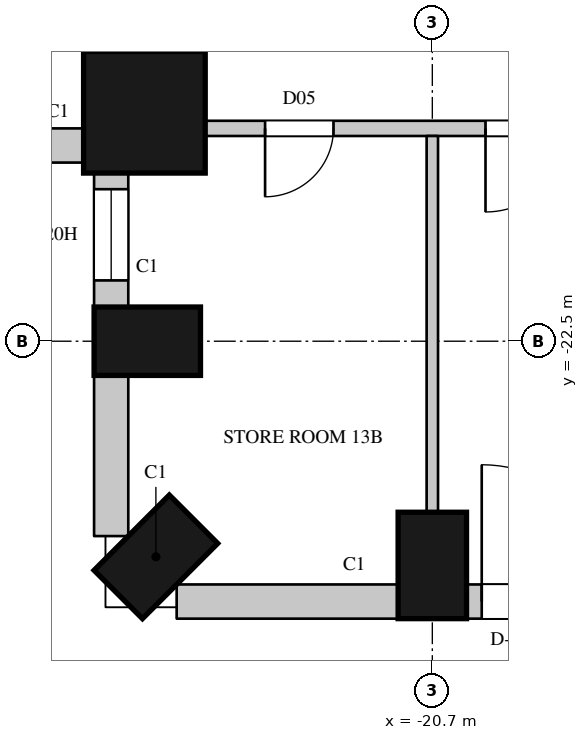
"""IFC4 building model, lengths in metres.
Left out: names, types, materials, properties, quantities, classifications, styles, units other than length and angle.
Written with IfcOpenShell. Run it as: python <this file> out.ifc"""

import sys

from ifc_helpers import new_model, si_unit, direction, frame, frame_2d, origin, origin_2d, place, context, subcontext, project, spatial, rectangle, circle, extrude, element, fill, save


model = new_model("IFC4")
c1 = context("Model", 3, precision=1e-05, world=origin(), true_north=direction((0.0, 1.0)))
c2 = subcontext(c1, "Body", "Model", "MODEL_VIEW")
j1 = project(units=[si_unit("LENGTHUNIT", "METRE"), si_unit("PLANEANGLEUNIT", "RADIAN")], contexts=[c1])
p1 = place(None, origin())
s1 = spatial("IfcSite", under=j1, at=p1, CompositionType="ELEMENT")
p2 = place(p1, origin())
s2 = spatial("IfcBuilding", under=s1, at=p2, CompositionType="ELEMENT")
p3 = place(p2, frame((0.0, 0.0, 77.1)))
s3 = spatial("IfcBuildingStorey", under=s2, at=p3, CompositionType="ELEMENT", Elevation=77.1)
p4 = place(p3, frame((-24.488, -19.488, 0.0), z_axis=(0.0, 0.0, 1.0), x_axis=(1.0, 0.0, 0.0)))
e1 = element("IfcColumn", 1, at=p4, inside=s3, PredefinedType="COLUMN", context=c2, shape_type="SweptSolid", body=[
    extrude(circle(Radius=0.8, at=origin_2d()), origin(), (0.0, 0.0, 1.0), 3.6),
])
for number, where, z_axis, x_axis in (
    (2, (-24.45, -22.5, 0.0), (0.0, 0.0, 1.0), (0.0, -1.0, 0.0)),
    (3, (-24.337, -25.337, 0.0), (0.0, 0.0, 1.0), (0.707, -0.707, 0.0)),
    (4, (-20.7, -25.45, 0.0), (0.0, 0.0, 1.0), (1.0, 0.0, 0.0)),
):
    element("IfcColumn", number, at=place(p3, frame(where, z_axis=z_axis, x_axis=x_axis)), inside=s3, PredefinedType="COLUMN", context=c2, shape_type="SweptSolid", body=[
        extrude(rectangle(XDim=0.9, YDim=1.4, at=origin_2d()), origin(), (0.0, 0.0, 1.0), 3.6),
    ])
p5 = place(p3, frame((-29.064, -19.925, 0.0), z_axis=(0.0, 0.0, 1.0), x_axis=(1.0, 0.0, 0.0)))
e5 = element("IfcWall", 5, at=p5, inside=s3, PredefinedType="SOLIDWALL", context=c2, shape_type="SweptSolid", body=[
    extrude(rectangle(XDim=3.805, YDim=0.45, at=frame_2d((1.903, 0.0))), origin(), (0.0, 0.0, 1.0), 3.3),
])
p6 = place(p5, frame((0.514, 0.0, 1.05)))
e6 = element("IfcOpeningElement", 6, at=p6, cuts=e5, PredefinedType="OPENING", context=c2, shape_type="SweptSolid", body=[
    extrude(rectangle(XDim=2.7, YDim=2.0, at=frame_2d((1.35, 1.0))), frame((0.0, 0.235, 0.0), z_axis=(0.0, -1.0, 0.0), x_axis=(1.0, 0.0, 0.0)), (0.0, 0.0, 1.0), 0.47),
])
p7 = place(p3, frame((-24.925, -20.259, 0.0), z_axis=(0.0, 0.0, 1.0), x_axis=(0.0, -1.0, 0.0)))
e7 = element("IfcWall", 7, at=p7, inside=s3, PredefinedType="SOLIDWALL", context=c2, shape_type="SweptSolid", body=[
    extrude(rectangle(XDim=1.792, YDim=0.45, at=frame_2d((0.896, 0.0))), origin(), (0.0, 0.0, 1.0), 3.3),
])
p8 = place(p7, frame((0.241, 0.0, 1.05)))
e8 = element("IfcOpeningElement", 8, at=p8, cuts=e7, PredefinedType="OPENING", context=c2, shape_type="SweptSolid", body=[
    extrude(rectangle(XDim=1.2, YDim=2.0, at=frame_2d((0.6, 1.0))), frame((0.0, 0.235, 0.0), z_axis=(0.0, -1.0, 0.0), x_axis=(1.0, 0.0, 0.0)), (0.0, 0.0, 1.0), 0.47),
])
p9 = place(p3, frame((-24.925, -22.95, 0.0), z_axis=(0.0, 0.0, 1.0), x_axis=(0.0, -1.0, 0.0)))
e9 = element("IfcWall", 9, at=p9, inside=s3, PredefinedType="SOLIDWALL", context=c2, shape_type="SweptSolid", body=[
    extrude(rectangle(XDim=2.114, YDim=0.45, at=frame_2d((1.057, 0.0))), origin(), (0.0, 0.0, 1.0), 3.3),
])
p10 = place(p3, frame((-24.064, -25.925, 0.0), z_axis=(0.0, 0.0, 1.0), x_axis=(1.0, 0.0, 0.0)))
e10 = element("IfcWall", 10, at=p10, inside=s3, PredefinedType="SOLIDWALL", context=c2, shape_type="SweptSolid", body=[
    extrude(rectangle(XDim=2.914, YDim=0.45, at=frame_2d((1.457, 0.0))), origin(), (0.0, 0.0, 1.0), 3.3),
])
p11 = place(p3, frame((-20.25, -25.925, 0.0), z_axis=(0.0, 0.0, 1.0), x_axis=(1.0, 0.0, 0.0)))
e11 = element("IfcWall", 11, at=p11, inside=s3, PredefinedType="SOLIDWALL", context=c2, shape_type="SweptSolid", body=[
    extrude(rectangle(XDim=8.1, YDim=0.45, at=frame_2d((4.05, 0.0))), origin(), (0.0, 0.0, 1.0), 3.3),
])
p12 = place(p11, frame((0.2, 0.0, 0.0)))
e12 = element("IfcOpeningElement", 12, at=p12, cuts=e11, PredefinedType="OPENING", context=c2, shape_type="SweptSolid", body=[
    extrude(rectangle(XDim=1.8, YDim=2.4, at=frame_2d((0.9, 1.2))), frame((0.0, 0.235, 0.0), z_axis=(0.0, -1.0, 0.0), x_axis=(1.0, 0.0, 0.0)), (0.0, 0.0, 1.0), 0.47),
])
p13 = place(p11, frame((2.2, 0.0, 1.05)))
e13 = element("IfcOpeningElement", 13, at=p13, cuts=e11, PredefinedType="OPENING", context=c2, shape_type="SweptSolid", body=[
    extrude(rectangle(XDim=1.2, YDim=2.0, at=frame_2d((0.6, 1.0))), frame((0.0, 0.235, 0.0), z_axis=(0.0, -1.0, 0.0), x_axis=(1.0, 0.0, 0.0)), (0.0, 0.0, 1.0), 0.47),
])
p14 = place(p11, frame((4.7, 0.0, 0.0)))
e14 = element("IfcOpeningElement", 14, at=p14, cuts=e11, PredefinedType="OPENING", context=c2, shape_type="SweptSolid", body=[
    extrude(rectangle(XDim=1.8, YDim=2.4, at=frame_2d((0.9, 1.2))), frame((0.0, 0.235, 0.0), z_axis=(0.0, -1.0, 0.0), x_axis=(1.0, 0.0, 0.0)), (0.0, 0.0, 1.0), 0.47),
])
p15 = place(p11, frame((6.7, 0.0, 1.05)))
e15 = element("IfcOpeningElement", 15, at=p15, cuts=e11, PredefinedType="OPENING", context=c2, shape_type="SweptSolid", body=[
    extrude(rectangle(XDim=1.2, YDim=2.0, at=frame_2d((0.6, 1.0))), frame((0.0, 0.235, 0.0), z_axis=(0.0, -1.0, 0.0), x_axis=(1.0, 0.0, 0.0)), (0.0, 0.0, 1.0), 0.47),
])
p16 = place(p3, frame((-24.7, -18.7, 0.0), z_axis=(0.0, 0.0, 1.0), x_axis=(0.0, 1.0, 0.0)))
e16 = element("IfcWall", 16, at=p16, inside=s3, PredefinedType="PARTITIONING", context=c2, shape_type="SweptSolid", body=[
    extrude(rectangle(XDim=2.67, YDim=0.2, at=frame_2d((1.335, 0.0))), origin(), (0.0, 0.0, 1.0), 3.3),
])
p17 = place(p16, frame((0.6, 0.0, 0.0)))
e17 = element("IfcOpeningElement", 17, at=p17, cuts=e16, PredefinedType="OPENING", context=c2, shape_type="SweptSolid", body=[
    extrude(rectangle(XDim=1.6, YDim=2.4, at=frame_2d((0.8, 1.2))), frame((0.0, 0.11, 0.0), z_axis=(0.0, -1.0, 0.0), x_axis=(1.0, 0.0, 0.0)), (0.0, 0.0, 1.0), 0.22),
])
p18 = place(p3, frame((-23.7, -19.7, 0.0), z_axis=(0.0, 0.0, 1.0), x_axis=(1.0, 0.0, 0.0)))
e18 = element("IfcWall", 18, at=p18, inside=s3, PredefinedType="PARTITIONING", context=c2, shape_type="SweptSolid", body=[
    extrude(rectangle(XDim=5.1, YDim=0.2, at=frame_2d((2.55, 0.0))), origin(), (0.0, 0.0, 1.0), 3.3),
])
p19 = place(p18, frame((0.8, 0.0, 0.0)))
e19 = element("IfcOpeningElement", 19, at=p19, cuts=e18, PredefinedType="OPENING", context=c2, shape_type="SweptSolid", body=[
    extrude(rectangle(XDim=0.9, YDim=2.2, at=frame_2d((0.45, 1.1))), frame((0.0, 0.11, 0.0), z_axis=(0.0, -1.0, 0.0), x_axis=(1.0, 0.0, 0.0)), (0.0, 0.0, 1.0), 0.22),
])
p20 = place(p18, frame((3.7, 0.0, 0.0)))
e20 = element("IfcOpeningElement", 20, at=p20, cuts=e18, PredefinedType="OPENING", context=c2, shape_type="SweptSolid", body=[
    extrude(rectangle(XDim=1.1, YDim=2.4, at=frame_2d((0.55, 1.2))), frame((0.0, 0.11, 0.0), z_axis=(0.0, -1.0, 0.0), x_axis=(1.0, 0.0, 0.0)), (0.0, 0.0, 1.0), 0.22),
])
p21 = place(p3, frame((-20.7, -24.75, 0.0), z_axis=(0.0, 0.0, 1.0), x_axis=(0.0, 1.0, 0.0)))
e21 = element("IfcWall", 21, at=p21, inside=s3, PredefinedType="PARTITIONING", context=c2, shape_type="SweptSolid", body=[
    extrude(rectangle(XDim=4.95, YDim=0.15, at=frame_2d((2.475, 0.0))), origin(), (0.0, 0.0, 1.0), 2.75),
])
p22 = place(p8, origin())
e22 = element("IfcWindow", 22, at=p22, inside=s3, PartitioningType="SINGLE_PANEL", PredefinedType="WINDOW", context=c2, shape_type="SweptSolid", body=[
    extrude(rectangle(XDim=1.2, YDim=2.0, at=frame_2d((0.6, 1.0))), frame((0.0, 0.135, 0.0), z_axis=(0.0, -1.0, 0.0), x_axis=(1.0, 0.0, 0.0)), (0.0, 0.0, 1.0), 0.06),
])
fill(e8, e22)
p23 = place(p12, origin())
e23 = element("IfcDoor", 23, at=p23, inside=s3, OperationType="SLIDING_TO_LEFT", PredefinedType="DOOR", context=c2, shape_type="SweptSolid", body=[
    extrude(rectangle(XDim=1.8, YDim=2.4, at=frame_2d((0.9, 1.2))), frame((0.0, 0.13, 0.0), z_axis=(0.0, -1.0, 0.0), x_axis=(1.0, 0.0, 0.0)), (0.0, 0.0, 1.0), 0.05),
])
fill(e12, e23)
p24 = place(p19, origin())
e24 = element("IfcDoor", 24, at=p24, inside=s3, OperationType="SINGLE_SWING_RIGHT", PredefinedType="DOOR", context=c2, shape_type="SweptSolid", body=[
    extrude(rectangle(XDim=0.9, YDim=2.2, at=frame_2d((0.45, 1.1))), frame((0.0, 0.025, 0.0), z_axis=(0.0, -1.0, 0.0), x_axis=(1.0, 0.0, 0.0)), (0.0, 0.0, 1.0), 0.05),
])
fill(e19, e24)
p25 = place(p20, origin())
e25 = element("IfcDoor", 25, at=p25, inside=s3, OperationType="SINGLE_SWING_RIGHT", PredefinedType="DOOR", context=c2, shape_type="SweptSolid", body=[
    extrude(rectangle(XDim=1.1, YDim=2.4, at=frame_2d((0.55, 1.2))), frame((0.0, 0.025, 0.0), z_axis=(0.0, -1.0, 0.0), x_axis=(1.0, 0.0, 0.0)), (0.0, 0.0, 1.0), 0.05),
])
fill(e20, e25)
save(model, sys.argv[1])
